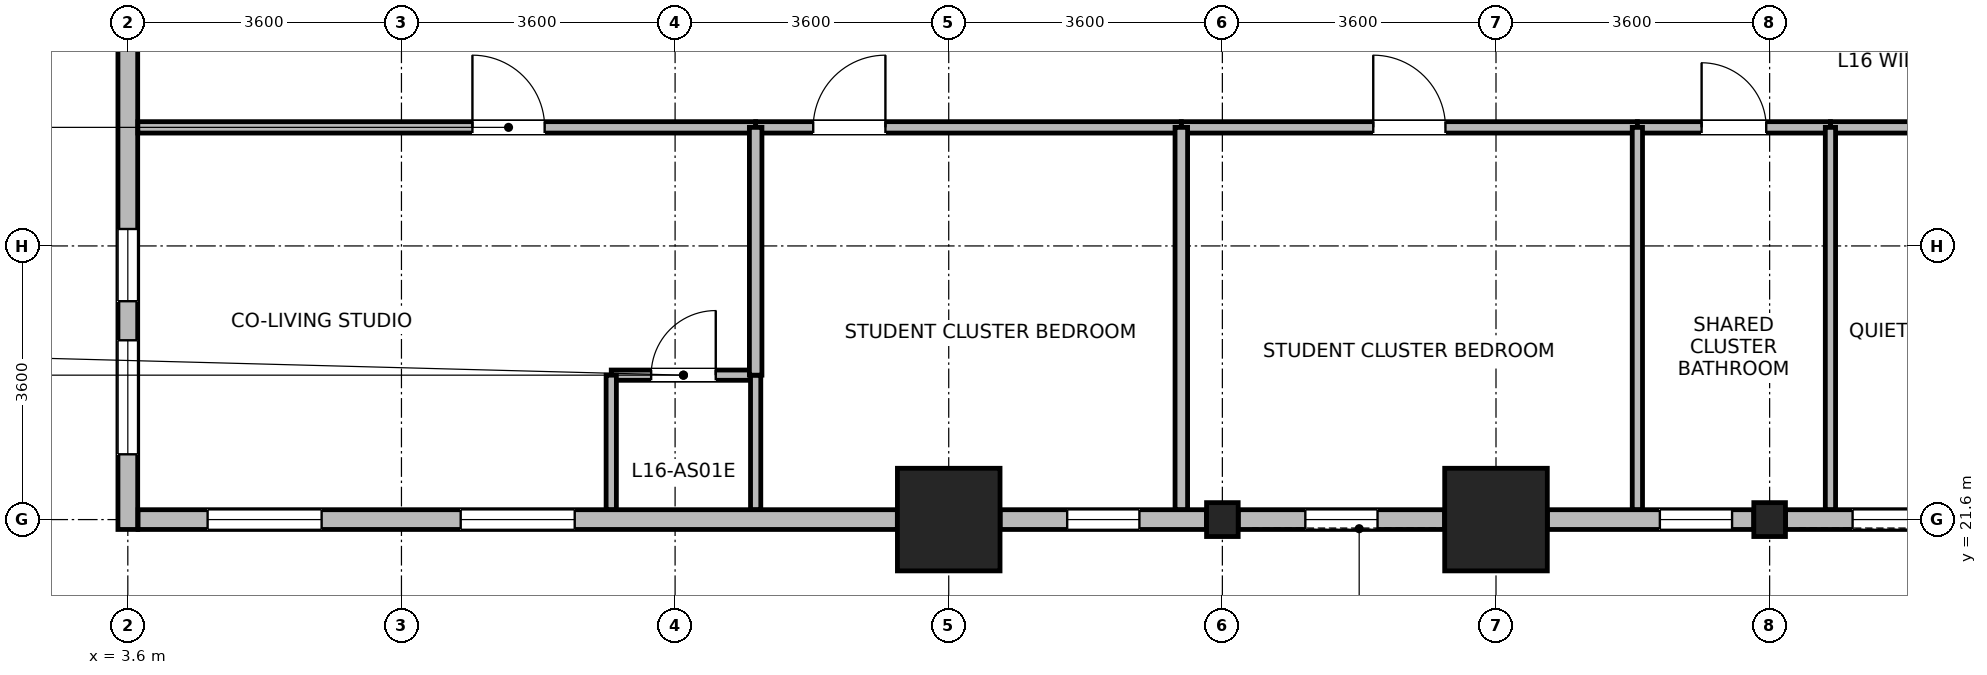
"""IFC4 building model, lengths in metres.
Left out: names, types, materials, properties, quantities, classifications, styles, units other than length and angle.
Written with IfcOpenShell. Run it as: python <this file> out.ifc"""

import sys

from ifc_helpers import new_model, si_unit, direction, frame, frame_2d, origin, origin_2d, place, context, subcontext, project, spatial, rectangle, i_section, extrude, source, transform, mapped, element, fill, save


model = new_model("IFC4")
c1 = context("Model", 3, precision=1e-05, world=origin(), true_north=direction((0.0, 1.0)))
c2 = subcontext(c1, "Body", "Model", "MODEL_VIEW")
j1 = project(units=[si_unit("LENGTHUNIT", "METRE"), si_unit("PLANEANGLEUNIT", "RADIAN")], contexts=[c1])
p1 = place(None, origin())
s1 = spatial("IfcSite", under=j1, at=p1, CompositionType="ELEMENT")
p2 = place(p1, origin())
s2 = spatial("IfcBuilding", under=s1, at=p2, CompositionType="ELEMENT")
p3 = place(p2, frame((0.0, 0.0, 66.0)))
s3 = spatial("IfcBuildingStorey", under=s2, at=p3, CompositionType="ELEMENT", Elevation=66.0)
m1 = source(origin(), c2, "Body", "SweptSolid", [
    extrude(rectangle(XDim=1.35, YDim=1.35, at=origin_2d()), origin(), (0.0, 0.0, 1.0), 3.7),
])
for number, where, z_axis, x_axis in (
    (1, (14.4, 21.6, 0.0), (0.0, 0.0, 1.0), (1.0, 0.0, 0.0)),
    (2, (21.6, 21.6, 0.0), (0.0, 0.0, 1.0), (1.0, 0.0, 0.0)),
):
    element("IfcColumn", number, at=place(p3, frame(where, z_axis=z_axis, x_axis=x_axis)), inside=s3, PredefinedType="COLUMN", context=c2, shape_type="MappedRepresentation", body=[
        mapped(m1, transform((0.0, 0.0, 0.0), x_axis=(1.0, 0.0, 0.0), y_axis=(0.0, 1.0, 0.0), z_axis=(0.0, 0.0, 1.0), scale=1.0)),
    ])
m2 = source(origin(), c2, "Body", "SweptSolid", [
    extrude(i_section(OverallWidth=0.416, OverallDepth=0.446, WebThickness=0.029, FlangeThickness=0.04, FilletRadius=0.015, at=origin_2d()), origin(), (0.0, 0.0, 1.0), 3.7),
])
for number, where, z_axis, x_axis in (
    (3, (18.0, 21.6, 0.0), (0.0, 0.0, 1.0), (1.0, 0.0, 0.0)),
    (4, (25.2, 21.6, 0.0), (0.0, 0.0, 1.0), (1.0, 0.0, 0.0)),
):
    element("IfcColumn", number, at=place(p3, frame(where, z_axis=z_axis, x_axis=x_axis)), inside=s3, PredefinedType="COLUMN", context=c2, shape_type="MappedRepresentation", body=[
        mapped(m2, transform((0.0, 0.0, 0.0), x_axis=(1.0, 0.0, 0.0), y_axis=(0.0, 1.0, 0.0), z_axis=(0.0, 0.0, 1.0), scale=1.0)),
    ])
p4 = place(p3, frame((3.6, 21.47, 0.0), z_axis=(0.0, 0.0, 1.0), x_axis=(0.0, 1.0, 0.0)))
e5 = element("IfcWall", 5, at=p4, inside=s3, PredefinedType="STANDARD", context=c2, shape_type="SweptSolid", body=[
    extrude(rectangle(XDim=6.956, YDim=0.26, at=frame_2d((3.478, 0.0))), origin(), (0.0, 0.0, 1.0), 3.43),
])
p5 = place(p4, frame((0.989, 0.0, 0.85)))
e6 = element("IfcOpeningElement", 6, at=p5, cuts=e5, PredefinedType="OPENING", context=c2, shape_type="SweptSolid", body=[
    extrude(rectangle(XDim=1.5, YDim=1.85, at=frame_2d((0.75, 0.925))), frame((0.0, 0.14, 0.0), z_axis=(0.0, -1.0, 0.0), x_axis=(1.0, 0.0, 0.0)), (0.0, 0.0, 1.0), 0.28),
])
p6 = place(p4, frame((3.003, 0.0, 0.85)))
e7 = element("IfcOpeningElement", 7, at=p6, cuts=e5, PredefinedType="OPENING", context=c2, shape_type="SweptSolid", body=[
    extrude(rectangle(XDim=0.95, YDim=1.75, at=frame_2d((0.475, 0.875))), frame((0.0, 0.14, 0.0), z_axis=(0.0, -1.0, 0.0), x_axis=(1.0, 0.0, 0.0)), (0.0, 0.0, 1.0), 0.28),
])
p7 = place(p3, frame((13.724, 21.6, 0.0), z_axis=(0.0, 0.0, 1.0), x_axis=(-1.0, 0.0, 0.0)))
e8 = element("IfcWall", 8, at=p7, inside=s3, PredefinedType="STANDARD", context=c2, shape_type="SweptSolid", body=[
    extrude(rectangle(XDim=9.989, YDim=0.26, at=frame_2d((4.995, 0.0))), origin(), (0.0, 0.0, 1.0), 3.43),
])
p8 = place(p7, frame((4.244, 0.0, 0.85)))
e9 = element("IfcOpeningElement", 9, at=p8, cuts=e8, PredefinedType="OPENING", context=c2, shape_type="SweptSolid", body=[
    extrude(rectangle(XDim=1.5, YDim=1.85, at=frame_2d((0.75, 0.925))), frame((0.0, 0.14, 0.0), z_axis=(0.0, -1.0, 0.0), x_axis=(1.0, 0.0, 0.0)), (0.0, 0.0, 1.0), 0.28),
])
p9 = place(p7, frame((7.574, 0.0, 0.85)))
e10 = element("IfcOpeningElement", 10, at=p9, cuts=e8, PredefinedType="OPENING", context=c2, shape_type="SweptSolid", body=[
    extrude(rectangle(XDim=1.5, YDim=1.85, at=frame_2d((0.75, 0.925))), frame((0.0, 0.14, 0.0), z_axis=(0.0, -1.0, 0.0), x_axis=(1.0, 0.0, 0.0)), (0.0, 0.0, 1.0), 0.28),
])
p10 = place(p3, frame((17.791, 21.6, 0.0), z_axis=(0.0, 0.0, 1.0), x_axis=(-1.0, 0.0, 0.0)))
e11 = element("IfcWall", 11, at=p10, inside=s3, PredefinedType="STANDARD", context=c2, shape_type="SweptSolid", body=[
    extrude(rectangle(XDim=2.715, YDim=0.26, at=frame_2d((1.357, 0.0))), origin(), (0.0, 0.0, 1.0), 2.93),
])
p11 = place(p10, frame((0.883, 0.0, 0.85)))
e12 = element("IfcOpeningElement", 12, at=p11, cuts=e11, PredefinedType="OPENING", context=c2, shape_type="SweptSolid", body=[
    extrude(rectangle(XDim=0.95, YDim=1.75, at=frame_2d((0.475, 0.875))), frame((0.0, 0.14, 0.0), z_axis=(0.0, -1.0, 0.0), x_axis=(1.0, 0.0, 0.0)), (0.0, 0.0, 1.0), 0.28),
])
p12 = place(p3, frame((20.924, 21.6, 0.0), z_axis=(0.0, 0.0, 1.0), x_axis=(-1.0, 0.0, 0.0)))
e13 = element("IfcWall", 13, at=p12, inside=s3, PredefinedType="STANDARD", context=c2, shape_type="SweptSolid", body=[
    extrude(rectangle(XDim=2.715, YDim=0.26, at=frame_2d((1.357, 0.0))), origin(), (0.0, 0.0, 1.0), 2.93),
])
p13 = place(p12, frame((0.883, 0.0, 0.85)))
e14 = element("IfcOpeningElement", 14, at=p13, cuts=e13, PredefinedType="OPENING", context=c2, shape_type="SweptSolid", body=[
    extrude(rectangle(XDim=0.95, YDim=1.75, at=frame_2d((0.475, 0.875))), frame((0.0, 0.14, 0.0), z_axis=(0.0, -1.0, 0.0), x_axis=(1.0, 0.0, 0.0)), (0.0, 0.0, 1.0), 0.28),
])
p14 = place(p3, frame((24.991, 21.6, 0.0), z_axis=(0.0, 0.0, 1.0), x_axis=(-1.0, 0.0, 0.0)))
e15 = element("IfcWall", 15, at=p14, inside=s3, PredefinedType="STANDARD", context=c2, shape_type="SweptSolid", body=[
    extrude(rectangle(XDim=2.715, YDim=0.26, at=frame_2d((1.357, 0.0))), origin(), (0.0, 0.0, 1.0), 2.93),
])
p15 = place(p14, frame((0.285, 0.0, 0.85)))
e16 = element("IfcOpeningElement", 16, at=p15, cuts=e15, PredefinedType="OPENING", context=c2, shape_type="SweptSolid", body=[
    extrude(rectangle(XDim=0.95, YDim=1.75, at=frame_2d((0.475, 0.875))), frame((0.0, 0.14, 0.0), z_axis=(0.0, -1.0, 0.0), x_axis=(1.0, 0.0, 0.0)), (0.0, 0.0, 1.0), 0.28),
])
p16 = place(p3, frame((28.124, 21.6, 0.0), z_axis=(0.0, 0.0, 1.0), x_axis=(-1.0, 0.0, 0.0)))
e17 = element("IfcWall", 17, at=p16, inside=s3, PredefinedType="STANDARD", context=c2, shape_type="SweptSolid", body=[
    extrude(rectangle(XDim=2.715, YDim=0.26, at=frame_2d((1.357, 0.0))), origin(), (0.0, 0.0, 1.0), 2.93),
])
p17 = place(p16, frame((0.883, 0.0, 0.85)))
e18 = element("IfcOpeningElement", 18, at=p17, cuts=e17, PredefinedType="OPENING", context=c2, shape_type="SweptSolid", body=[
    extrude(rectangle(XDim=0.95, YDim=1.75, at=frame_2d((0.475, 0.875))), frame((0.0, 0.14, 0.0), z_axis=(0.0, -1.0, 0.0), x_axis=(1.0, 0.0, 0.0)), (0.0, 0.0, 1.0), 0.28),
])
p18 = place(p3, frame((9.96, 23.5, 0.0), z_axis=(0.0, 0.0, 1.0), x_axis=(1.0, 0.0, 0.0)))
e19 = element("IfcWall", 19, at=p18, inside=s3, PredefinedType="PARTITIONING", context=c2, shape_type="SweptSolid", body=[
    extrude(rectangle(XDim=1.9, YDim=0.135, at=frame_2d((0.95, 0.0))), origin(), (0.0, 0.0, 1.0), 3.43),
])
p19 = place(p18, frame((0.525, 0.0, 0.0)))
e20 = element("IfcOpeningElement", 20, at=p19, cuts=e19, PredefinedType="OPENING", context=c2, shape_type="SweptSolid", body=[
    extrude(rectangle(XDim=0.85, YDim=2.04, at=frame_2d((0.425, 1.02))), frame((0.0, 0.078, 0.0), z_axis=(0.0, -1.0, 0.0), x_axis=(1.0, 0.0, 0.0)), (0.0, 0.0, 1.0), 0.155),
])
for number, where, z_axis, x_axis in (
    (21, (9.96, 21.732, 0.0), (0.0, 0.0, 1.0), (0.0, 1.0, 0.0)),
    (22, (11.86, 21.732, 0.0), (0.0, 0.0, 1.0), (0.0, 1.0, 0.0)),
):
    element("IfcWall", number, at=place(p3, frame(where, z_axis=z_axis, x_axis=x_axis)), inside=s3, PredefinedType="PARTITIONING", context=c2, shape_type="SweptSolid", body=[
        extrude(rectangle(XDim=1.768, YDim=0.135, at=frame_2d((0.884, 0.0))), origin(), (0.0, 0.0, 1.0), 3.43),
    ])
p20 = place(p3, frame((3.732, 26.76, 0.0), z_axis=(0.0, 0.0, 1.0), x_axis=(1.0, 0.0, 0.0)))
e23 = element("IfcWall", 23, at=p20, inside=s3, PredefinedType="PARTITIONING", context=c2, shape_type="SweptSolid", body=[
    extrude(rectangle(XDim=8.128, YDim=0.15, at=frame_2d((4.064, 0.0))), origin(), (0.0, 0.0, 1.0), 3.43),
])
p21 = place(p20, frame((4.402, 0.0, 0.0)))
e24 = element("IfcOpeningElement", 24, at=p21, cuts=e23, PredefinedType="OPENING", context=c2, shape_type="SweptSolid", body=[
    extrude(rectangle(XDim=0.95, YDim=2.1, at=frame_2d((0.475, 1.05))), frame((0.0, 0.085, 0.0), z_axis=(0.0, -1.0, 0.0), x_axis=(1.0, 0.0, 0.0)), (0.0, 0.0, 1.0), 0.17),
])
p22 = place(p3, frame((26.0, 26.76, 0.0), z_axis=(0.0, 0.0, 1.0), x_axis=(1.0, 0.0, 0.0)))
e25 = element("IfcWall", 25, at=p22, inside=s3, PredefinedType="PARTITIONING", context=c2, shape_type="SweptSolid", body=[
    extrude(rectangle(XDim=7.36, YDim=0.15, at=frame_2d((3.68, 0.0))), origin(), (0.0, 0.0, 1.0), 3.43),
])
p23 = place(p22, frame((3.766, 0.0, 0.0)))
e26 = element("IfcOpeningElement", 26, at=p23, cuts=e25, PredefinedType="OPENING", context=c2, shape_type="SweptSolid", body=[
    extrude(rectangle(XDim=1.3, YDim=2.12, at=frame_2d((0.65, 1.06))), frame((0.0, 0.085, 0.0), z_axis=(0.0, -1.0, 0.0), x_axis=(1.0, 0.0, 0.0)), (0.0, 0.0, 1.0), 0.17),
])
p24 = place(p3, frame((17.46, 26.76, 0.0), z_axis=(0.0, 0.0, 1.0), x_axis=(1.0, 0.0, 0.0)))
e27 = element("IfcWall", 27, at=p24, inside=s3, PredefinedType="PARTITIONING", context=c2, shape_type="SweptSolid", body=[
    extrude(rectangle(XDim=6.0, YDim=0.15, at=frame_2d((3.0, 0.0))), origin(), (0.0, 0.0, 1.0), 3.43),
])
p25 = place(p24, frame((2.525, 0.0, 0.0)))
e28 = element("IfcOpeningElement", 28, at=p25, cuts=e27, PredefinedType="OPENING", context=c2, shape_type="SweptSolid", body=[
    extrude(rectangle(XDim=0.95, YDim=2.1, at=frame_2d((0.475, 1.05))), frame((0.0, 0.085, 0.0), z_axis=(0.0, -1.0, 0.0), x_axis=(1.0, 0.0, 0.0)), (0.0, 0.0, 1.0), 0.17),
])
p26 = place(p3, frame((11.86, 26.76, 0.0), z_axis=(0.0, 0.0, 1.0), x_axis=(1.0, 0.0, 0.0)))
e29 = element("IfcWall", 29, at=p26, inside=s3, PredefinedType="PARTITIONING", context=c2, shape_type="SweptSolid", body=[
    extrude(rectangle(XDim=5.6, YDim=0.15, at=frame_2d((2.8, 0.0))), origin(), (0.0, 0.0, 1.0), 3.43),
])
p27 = place(p26, frame((0.757, 0.0, 0.0)))
e30 = element("IfcOpeningElement", 30, at=p27, cuts=e29, PredefinedType="OPENING", context=c2, shape_type="SweptSolid", body=[
    extrude(rectangle(XDim=0.95, YDim=2.1, at=frame_2d((0.475, 1.05))), frame((0.0, 0.085, 0.0), z_axis=(0.0, -1.0, 0.0), x_axis=(1.0, 0.0, 0.0)), (0.0, 0.0, 1.0), 0.17),
])
p28 = place(p3, frame((23.46, 26.76, 0.0), z_axis=(0.0, 0.0, 1.0), x_axis=(1.0, 0.0, 0.0)))
e31 = element("IfcWall", 31, at=p28, inside=s3, PredefinedType="PARTITIONING", context=c2, shape_type="SweptSolid", body=[
    extrude(rectangle(XDim=2.54, YDim=0.15, at=frame_2d((1.27, 0.0))), origin(), (0.0, 0.0, 1.0), 3.43),
])
p29 = place(p28, frame((0.845, 0.0, 0.0)))
e32 = element("IfcOpeningElement", 32, at=p29, cuts=e31, PredefinedType="OPENING", context=c2, shape_type="SweptSolid", body=[
    extrude(rectangle(XDim=0.85, YDim=2.04, at=frame_2d((0.425, 1.02))), frame((0.0, 0.085, 0.0), z_axis=(0.0, -1.0, 0.0), x_axis=(1.0, 0.0, 0.0)), (0.0, 0.0, 1.0), 0.17),
])
p30 = place(p3, frame((17.46, 21.732, 0.0), z_axis=(0.0, 0.0, 1.0), x_axis=(0.0, 1.0, 0.0)))
e33 = element("IfcWall", 33, at=p30, inside=s3, PredefinedType="PARTITIONING", context=c2, shape_type="SweptSolid", body=[
    extrude(rectangle(XDim=5.028, YDim=0.165, at=frame_2d((2.514, 0.0))), origin(), (0.0, 0.0, 1.0), 3.43),
])
for number, where, z_axis, x_axis in (
    (34, (23.46, 21.732, 0.0), (0.0, 0.0, 1.0), (0.0, 1.0, 0.0)),
    (35, (26.0, 21.732, 0.0), (0.0, 0.0, 1.0), (0.0, 1.0, 0.0)),
):
    element("IfcWall", number, at=place(p3, frame(where, z_axis=z_axis, x_axis=x_axis)), inside=s3, PredefinedType="PARTITIONING", context=c2, shape_type="SweptSolid", body=[
        extrude(rectangle(XDim=5.028, YDim=0.135, at=frame_2d((2.514, 0.0))), origin(), (0.0, 0.0, 1.0), 3.43),
    ])
p31 = place(p3, frame((11.86, 23.5, 0.0), z_axis=(0.0, 0.0, 1.0), x_axis=(0.0, 1.0, 0.0)))
e36 = element("IfcWall", 36, at=p31, inside=s3, PredefinedType="PARTITIONING", context=c2, shape_type="SweptSolid", body=[
    extrude(rectangle(XDim=3.26, YDim=0.165, at=frame_2d((1.63, 0.0))), origin(), (0.0, 0.0, 1.0), 3.43),
])
p32 = place(p5, origin())
e37 = element("IfcWindow", 37, at=p32, inside=s3, PartitioningType="SINGLE_PANEL", PredefinedType="WINDOW", context=c2, shape_type="SweptSolid", body=[
    extrude(rectangle(XDim=1.5, YDim=1.85, at=frame_2d((0.75, 0.925))), frame((0.0, 0.03, 0.0), z_axis=(0.0, -1.0, 0.0), x_axis=(1.0, 0.0, 0.0)), (0.0, 0.0, 1.0), 0.06),
])
fill(e6, e37)
p33 = place(p6, origin())
e38 = element("IfcWindow", 38, at=p33, inside=s3, PartitioningType="SINGLE_PANEL", PredefinedType="WINDOW", context=c2, shape_type="SweptSolid", body=[
    extrude(rectangle(XDim=0.95, YDim=1.75, at=frame_2d((0.475, 0.875))), frame((0.0, 0.03, 0.0), z_axis=(0.0, -1.0, 0.0), x_axis=(1.0, 0.0, 0.0)), (0.0, 0.0, 1.0), 0.06),
])
fill(e7, e38)
p34 = place(p8, origin())
e39 = element("IfcWindow", 39, at=p34, inside=s3, PartitioningType="SINGLE_PANEL", PredefinedType="WINDOW", context=c2, shape_type="SweptSolid", body=[
    extrude(rectangle(XDim=1.5, YDim=1.85, at=frame_2d((0.75, 0.925))), frame((0.0, 0.03, 0.0), z_axis=(0.0, -1.0, 0.0), x_axis=(1.0, 0.0, 0.0)), (0.0, 0.0, 1.0), 0.06),
])
fill(e9, e39)
p35 = place(p9, origin())
e40 = element("IfcWindow", 40, at=p35, inside=s3, PartitioningType="SINGLE_PANEL", PredefinedType="WINDOW", context=c2, shape_type="SweptSolid", body=[
    extrude(rectangle(XDim=1.5, YDim=1.85, at=frame_2d((0.75, 0.925))), frame((0.0, 0.03, 0.0), z_axis=(0.0, -1.0, 0.0), x_axis=(1.0, 0.0, 0.0)), (0.0, 0.0, 1.0), 0.06),
])
fill(e10, e40)
p36 = place(p11, origin())
e41 = element("IfcWindow", 41, at=p36, inside=s3, PartitioningType="SINGLE_PANEL", PredefinedType="WINDOW", context=c2, shape_type="SweptSolid", body=[
    extrude(rectangle(XDim=0.95, YDim=1.75, at=frame_2d((0.475, 0.875))), frame((0.0, 0.03, 0.0), z_axis=(0.0, -1.0, 0.0), x_axis=(1.0, 0.0, 0.0)), (0.0, 0.0, 1.0), 0.06),
])
fill(e12, e41)
p37 = place(p13, origin())
e42 = element("IfcWindow", 42, at=p37, inside=s3, PartitioningType="SINGLE_PANEL", PredefinedType="WINDOW", context=c2, shape_type="SweptSolid", body=[
    extrude(rectangle(XDim=0.95, YDim=1.75, at=frame_2d((0.475, 0.875))), frame((0.0, 0.03, 0.0), z_axis=(0.0, -1.0, 0.0), x_axis=(1.0, 0.0, 0.0)), (0.0, 0.0, 1.0), 0.06),
])
fill(e14, e42)
p38 = place(p15, origin())
e43 = element("IfcWindow", 43, at=p38, inside=s3, PartitioningType="SINGLE_PANEL", PredefinedType="WINDOW", context=c2, shape_type="SweptSolid", body=[
    extrude(rectangle(XDim=0.95, YDim=1.75, at=frame_2d((0.475, 0.875))), frame((0.0, 0.03, 0.0), z_axis=(0.0, -1.0, 0.0), x_axis=(1.0, 0.0, 0.0)), (0.0, 0.0, 1.0), 0.06),
])
fill(e16, e43)
p39 = place(p17, origin())
e44 = element("IfcWindow", 44, at=p39, inside=s3, PartitioningType="SINGLE_PANEL", PredefinedType="WINDOW", context=c2, shape_type="SweptSolid", body=[
    extrude(rectangle(XDim=0.95, YDim=1.75, at=frame_2d((0.475, 0.875))), frame((0.0, 0.03, 0.0), z_axis=(0.0, -1.0, 0.0), x_axis=(1.0, 0.0, 0.0)), (0.0, 0.0, 1.0), 0.06),
])
fill(e18, e44)
p40 = place(p19, origin())
e45 = element("IfcDoor", 45, at=p40, inside=s3, OperationType="SINGLE_SWING_RIGHT", PredefinedType="DOOR", context=c2, shape_type="SweptSolid", body=[
    extrude(rectangle(XDim=0.85, YDim=2.04, at=frame_2d((0.425, 1.02))), frame((0.0, 0.025, 0.0), z_axis=(0.0, -1.0, 0.0), x_axis=(1.0, 0.0, 0.0)), (0.0, 0.0, 1.0), 0.05),
])
fill(e20, e45)
p41 = place(p21, origin())
e46 = element("IfcDoor", 46, at=p41, inside=s3, OperationType="SINGLE_SWING_LEFT", PredefinedType="DOOR", context=c2, shape_type="SweptSolid", body=[
    extrude(rectangle(XDim=0.95, YDim=2.1, at=frame_2d((0.475, 1.05))), frame((0.0, 0.025, 0.0), z_axis=(0.0, -1.0, 0.0), x_axis=(1.0, 0.0, 0.0)), (0.0, 0.0, 1.0), 0.05),
])
fill(e24, e46)
p42 = place(p25, origin())
e47 = element("IfcDoor", 47, at=p42, inside=s3, OperationType="SINGLE_SWING_LEFT", PredefinedType="DOOR", context=c2, shape_type="SweptSolid", body=[
    extrude(rectangle(XDim=0.95, YDim=2.1, at=frame_2d((0.475, 1.05))), frame((0.0, 0.025, 0.0), z_axis=(0.0, -1.0, 0.0), x_axis=(1.0, 0.0, 0.0)), (0.0, 0.0, 1.0), 0.05),
])
fill(e28, e47)
p43 = place(p27, origin())
e48 = element("IfcDoor", 48, at=p43, inside=s3, OperationType="SINGLE_SWING_RIGHT", PredefinedType="DOOR", context=c2, shape_type="SweptSolid", body=[
    extrude(rectangle(XDim=0.95, YDim=2.1, at=frame_2d((0.475, 1.05))), frame((0.0, 0.025, 0.0), z_axis=(0.0, -1.0, 0.0), x_axis=(1.0, 0.0, 0.0)), (0.0, 0.0, 1.0), 0.05),
])
fill(e30, e48)
p44 = place(p29, origin())
e49 = element("IfcDoor", 49, at=p44, inside=s3, OperationType="SINGLE_SWING_LEFT", PredefinedType="DOOR", context=c2, shape_type="SweptSolid", body=[
    extrude(rectangle(XDim=0.85, YDim=2.04, at=frame_2d((0.425, 1.02))), frame((0.0, 0.025, 0.0), z_axis=(0.0, -1.0, 0.0), x_axis=(1.0, 0.0, 0.0)), (0.0, 0.0, 1.0), 0.05),
])
fill(e32, e49)
save(model, sys.argv[1])
